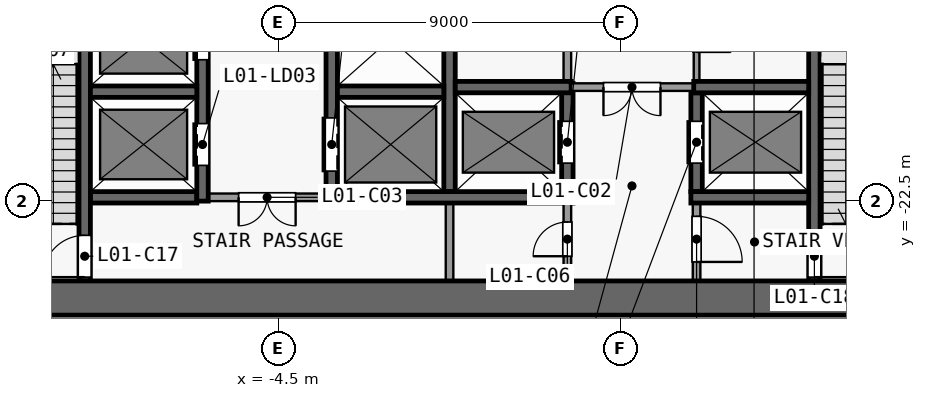
"""IFC4 building model, lengths in metres.
Left out: names, types, materials, properties, quantities, classifications, styles, units other than length and angle.
Written with IfcOpenShell. Run it as: python <this file> out.ifc"""

import sys

from ifc_helpers import new_model, si_unit, direction, frame, frame_2d, origin, place, context, subcontext, project, spatial, rectangle, extrude, element, fill, save


model = new_model("IFC4")
c1 = context("Model", 3, precision=1e-05, world=origin(), true_north=direction((0.0, 1.0)))
c2 = subcontext(c1, "Body", "Model", "MODEL_VIEW")
j1 = project(units=[si_unit("LENGTHUNIT", "METRE"), si_unit("PLANEANGLEUNIT", "RADIAN")], contexts=[c1])
p1 = place(None, origin())
s1 = spatial("IfcSite", under=j1, at=p1, CompositionType="ELEMENT")
p2 = place(p1, origin())
s2 = spatial("IfcBuilding", under=s1, at=p2, CompositionType="ELEMENT")
p3 = place(p2, frame((0.0, 0.0, 8.0)))
s3 = spatial("IfcBuildingStorey", under=s2, at=p3, CompositionType="ELEMENT", Elevation=8.0)
p4 = place(p3, frame((-13.5, -25.05, 0.0), z_axis=(0.0, 0.0, 1.0), x_axis=(1.0, 0.0, 0.0)))
e1 = element("IfcWall", 1, at=p4, inside=s3, PredefinedType="SHEAR", context=c2, shape_type="SweptSolid", body=[
    extrude(rectangle(XDim=27.0, YDim=0.9, at=frame_2d((13.5, 0.0))), origin(), (0.0, 0.0, 1.0), 5.15),
])
p5 = place(p3, frame((-9.45, -22.4, 0.0), z_axis=(0.0, 0.0, 1.0), x_axis=(1.0, 0.0, 0.0)))
e2 = element("IfcWall", 2, at=p5, inside=s3, PredefinedType="SHEAR", context=c2, shape_type="SweptSolid", body=[
    extrude(rectangle(XDim=2.8, YDim=0.3, at=frame_2d((1.4, 0.0))), origin(), (0.0, 0.0, 1.0), 5.15),
])
p6 = place(p3, frame((-3.25, -22.4, 0.0), z_axis=(0.0, 0.0, 1.0), x_axis=(-1.0, 0.0, 0.0)))
e3 = element("IfcWall", 3, at=p6, inside=s3, PredefinedType="PARTITIONING", context=c2, shape_type="SweptSolid", body=[
    extrude(rectangle(XDim=3.1, YDim=0.2, at=frame_2d((1.55, 0.0))), origin(), (0.0, 0.0, 1.0), 5.15),
])
p7 = place(p6, frame((0.8, 0.0, 0.0)))
e4 = element("IfcOpeningElement", 4, at=p7, cuts=e3, PredefinedType="OPENING", context=c2, shape_type="SweptSolid", body=[
    extrude(rectangle(XDim=1.5, YDim=2.1, at=frame_2d((0.75, 1.05))), frame((0.0, 0.11, 0.0), z_axis=(0.0, -1.0, 0.0), x_axis=(1.0, 0.0, 0.0)), (0.0, 0.0, 1.0), 0.22),
])
p8 = place(p3, frame((-2.95, -22.4, 0.0), z_axis=(0.0, 0.0, 1.0), x_axis=(1.0, 0.0, 0.0)))
e5 = element("IfcWall", 5, at=p8, inside=s3, PredefinedType="SHEAR", context=c2, shape_type="SweptSolid", body=[
    extrude(rectangle(XDim=6.2, YDim=0.3, at=frame_2d((3.1, 0.0))), origin(), (0.0, 0.0, 1.0), 5.15),
])
p9 = place(p3, frame((6.35, -22.4, 0.0), z_axis=(0.0, 0.0, 1.0), x_axis=(1.0, 0.0, 0.0)))
e6 = element("IfcWall", 6, at=p9, inside=s3, PredefinedType="SHEAR", context=c2, shape_type="SweptSolid", body=[
    extrude(rectangle(XDim=3.1, YDim=0.3, at=frame_2d((1.55, 0.0))), origin(), (0.0, 0.0, 1.0), 5.15),
])
for number, where, z_axis, x_axis in (
    (7, (-9.45, -19.62, 0.0), (0.0, 0.0, 1.0), (1.0, 0.0, 0.0)),
    (8, (-2.95, -19.62, 0.0), (0.0, 0.0, 1.0), (1.0, 0.0, 0.0)),
):
    element("IfcWall", number, at=place(p3, frame(where, z_axis=z_axis, x_axis=x_axis)), inside=s3, PredefinedType="SHEAR", context=c2, shape_type="SweptSolid", body=[
        extrude(rectangle(XDim=2.8, YDim=0.3, at=frame_2d((1.4, 0.0))), origin(), (0.0, 0.0, 1.0), 5.15),
    ])
p10 = place(p3, frame((0.15, -19.5, 0.0), z_axis=(0.0, 0.0, 1.0), x_axis=(1.0, 0.0, 0.0)))
e9 = element("IfcWall", 9, at=p10, inside=s3, PredefinedType="SHEAR", context=c2, shape_type="SweptSolid", body=[
    extrude(rectangle(XDim=3.05, YDim=0.3, at=frame_2d((1.525, 0.0))), origin(), (0.0, 0.0, 1.0), 5.15),
])
p11 = place(p3, frame((6.575, -19.5, 0.0), z_axis=(0.0, 0.0, 1.0), x_axis=(-1.0, 0.0, 0.0)))
e10 = element("IfcWall", 10, at=p11, inside=s3, PredefinedType="PARTITIONING", context=c2, shape_type="SweptSolid", body=[
    extrude(rectangle(XDim=3.375, YDim=0.2, at=frame_2d((1.688, 0.0))), origin(), (0.0, 0.0, 1.0), 5.15),
])
p12 = place(p11, frame((1.025, 0.0, 0.0)))
e11 = element("IfcOpeningElement", 11, at=p12, cuts=e10, PredefinedType="OPENING", context=c2, shape_type="SweptSolid", body=[
    extrude(rectangle(XDim=1.5, YDim=2.1, at=frame_2d((0.75, 1.05))), frame((0.0, 0.11, 0.0), z_axis=(0.0, -1.0, 0.0), x_axis=(1.0, 0.0, 0.0)), (0.0, 0.0, 1.0), 0.22),
])
p13 = place(p3, frame((6.425, -19.5, 0.0), z_axis=(0.0, 0.0, 1.0), x_axis=(1.0, 0.0, 0.0)))
e12 = element("IfcWall", 12, at=p13, inside=s3, PredefinedType="SHEAR", context=c2, shape_type="SweptSolid", body=[
    extrude(rectangle(XDim=3.025, YDim=0.3, at=frame_2d((1.512, 0.0))), origin(), (0.0, 0.0, 1.0), 5.15),
])
p14 = place(p3, frame((-9.6, -24.6, 0.0), z_axis=(0.0, 0.0, 1.0), x_axis=(0.0, 1.0, 0.0)))
e13 = element("IfcWall", 13, at=p14, inside=s3, PredefinedType="SHEAR", context=c2, shape_type="SweptSolid", body=[
    extrude(rectangle(XDim=7.7, YDim=0.3, at=frame_2d((3.85, 0.0))), origin(), (0.0, 0.0, 1.0), 5.15),
])
p15 = place(p14, frame((0.1, 0.0, 0.0)))
e14 = element("IfcOpeningElement", 14, at=p15, cuts=e13, PredefinedType="OPENING", context=c2, shape_type="SweptSolid", body=[
    extrude(rectangle(XDim=1.1, YDim=2.1, at=frame_2d((0.55, 1.05))), frame((0.0, 0.16, 0.0), z_axis=(0.0, -1.0, 0.0), x_axis=(1.0, 0.0, 0.0)), (0.0, 0.0, 1.0), 0.32),
])
p16 = place(p3, frame((-6.5, -22.5, 0.0), z_axis=(0.0, 0.0, 1.0), x_axis=(0.0, 1.0, 0.0)))
e15 = element("IfcWall", 15, at=p16, inside=s3, PredefinedType="SHEAR", context=c2, shape_type="SweptSolid", body=[
    extrude(rectangle(XDim=14.0, YDim=0.3, at=frame_2d((7.0, 0.0))), origin(), (0.0, 0.0, 1.0), 5.15),
])
p17 = place(p16, frame((0.94, 0.0, 0.0)))
e16 = element("IfcOpeningElement", 16, at=p17, cuts=e15, PredefinedType="OPENING", context=c2, shape_type="SweptSolid", body=[
    extrude(rectangle(XDim=1.1, YDim=2.1, at=frame_2d((0.55, 1.05))), frame((0.0, 0.16, 0.0), z_axis=(0.0, -1.0, 0.0), x_axis=(1.0, 0.0, 0.0)), (0.0, 0.0, 1.0), 0.32),
])
p18 = place(p16, frame((3.72, 0.0, 0.0)))
e17 = element("IfcOpeningElement", 17, at=p18, cuts=e15, PredefinedType="OPENING", context=c2, shape_type="SweptSolid", body=[
    extrude(rectangle(XDim=1.1, YDim=2.1, at=frame_2d((0.55, 1.05))), frame((0.0, 0.16, 0.0), z_axis=(0.0, -1.0, 0.0), x_axis=(1.0, 0.0, 0.0)), (0.0, 0.0, 1.0), 0.32),
])
p19 = place(p16, frame((6.5, 0.0, 0.0)))
e18 = element("IfcOpeningElement", 18, at=p19, cuts=e15, PredefinedType="OPENING", context=c2, shape_type="SweptSolid", body=[
    extrude(rectangle(XDim=1.1, YDim=2.1, at=frame_2d((0.55, 1.05))), frame((0.0, 0.16, 0.0), z_axis=(0.0, -1.0, 0.0), x_axis=(1.0, 0.0, 0.0)), (0.0, 0.0, 1.0), 0.32),
])
p20 = place(p16, frame((9.28, 0.0, 0.0)))
e19 = element("IfcOpeningElement", 19, at=p20, cuts=e15, PredefinedType="OPENING", context=c2, shape_type="SweptSolid", body=[
    extrude(rectangle(XDim=1.1, YDim=2.1, at=frame_2d((0.55, 1.05))), frame((0.0, 0.16, 0.0), z_axis=(0.0, -1.0, 0.0), x_axis=(1.0, 0.0, 0.0)), (0.0, 0.0, 1.0), 0.32),
])
p21 = place(p16, frame((12.06, 0.0, 0.0)))
e20 = element("IfcOpeningElement", 20, at=p21, cuts=e15, PredefinedType="OPENING", context=c2, shape_type="SweptSolid", body=[
    extrude(rectangle(XDim=1.1, YDim=2.1, at=frame_2d((0.55, 1.05))), frame((0.0, 0.16, 0.0), z_axis=(0.0, -1.0, 0.0), x_axis=(1.0, 0.0, 0.0)), (0.0, 0.0, 1.0), 0.32),
])
p22 = place(p3, frame((-3.1, -22.55, 0.0), z_axis=(0.0, 0.0, 1.0), x_axis=(0.0, 1.0, 0.0)))
e21 = element("IfcWall", 21, at=p22, inside=s3, PredefinedType="SHEAR", context=c2, shape_type="SweptSolid", body=[
    extrude(rectangle(XDim=14.05, YDim=0.3, at=frame_2d((7.025, 0.0))), origin(), (0.0, 0.0, 1.0), 5.15),
])
p23 = place(p22, frame((12.11, 0.0, 0.0)))
e22 = element("IfcOpeningElement", 22, at=p23, cuts=e21, PredefinedType="OPENING", context=c2, shape_type="SweptSolid", body=[
    extrude(rectangle(XDim=1.1, YDim=2.1, at=frame_2d((0.55, 1.05))), frame((0.0, 0.16, 0.0), z_axis=(0.0, -1.0, 0.0), x_axis=(1.0, 0.0, 0.0)), (0.0, 0.0, 1.0), 0.32),
])
p24 = place(p22, frame((0.84, 0.0, 0.0)))
e23 = element("IfcOpeningElement", 23, at=p24, cuts=e21, PredefinedType="OPENING", context=c2, shape_type="SweptSolid", body=[
    extrude(rectangle(XDim=1.4, YDim=2.1, at=frame_2d((0.7, 1.05))), frame((0.0, 0.16, 0.0), z_axis=(0.0, -1.0, 0.0), x_axis=(1.0, 0.0, 0.0)), (0.0, 0.0, 1.0), 0.32),
])
p25 = place(p3, frame((0.0, -24.6, 0.0), z_axis=(0.0, 0.0, 1.0), x_axis=(0.0, 1.0, 0.0)))
e24 = element("IfcWall", 24, at=p25, inside=s3, PredefinedType="PARTITIONING", context=c2, shape_type="SweptSolid", body=[
    extrude(rectangle(XDim=2.05, YDim=0.2, at=frame_2d((1.025, 0.0))), origin(), (0.0, 0.0, 1.0), 5.15),
])
p26 = place(p3, frame((0.0, -22.25, 0.0), z_axis=(0.0, 0.0, 1.0), x_axis=(0.0, 1.0, 0.0)))
e25 = element("IfcWall", 25, at=p26, inside=s3, PredefinedType="SHEAR", context=c2, shape_type="SweptSolid", body=[
    extrude(rectangle(XDim=13.75, YDim=0.3, at=frame_2d((6.875, 0.0))), origin(), (0.0, 0.0, 1.0), 5.15),
])
p27 = place(p3, frame((3.1, -24.6, 0.0), z_axis=(0.0, 0.0, 1.0), x_axis=(0.0, 1.0, 0.0)))
e26 = element("IfcWall", 26, at=p27, inside=s3, PredefinedType="PARTITIONING", context=c2, shape_type="SweptSolid", body=[
    extrude(rectangle(XDim=2.05, YDim=0.2, at=frame_2d((1.025, 0.0))), origin(), (0.0, 0.0, 1.0), 5.15),
])
p28 = place(p27, frame((0.65, 0.0, 0.0)))
e27 = element("IfcOpeningElement", 27, at=p28, cuts=e26, PredefinedType="OPENING", context=c2, shape_type="SweptSolid", body=[
    extrude(rectangle(XDim=0.9, YDim=2.1, at=frame_2d((0.45, 1.05))), frame((0.0, 0.11, 0.0), z_axis=(0.0, -1.0, 0.0), x_axis=(1.0, 0.0, 0.0)), (0.0, 0.0, 1.0), 0.22),
])
p29 = place(p3, frame((3.1, -22.25, 0.0), z_axis=(0.0, 0.0, 1.0), x_axis=(0.0, 1.0, 0.0)))
e28 = element("IfcWall", 28, at=p29, inside=s3, PredefinedType="SHEAR", context=c2, shape_type="SweptSolid", body=[
    extrude(rectangle(XDim=2.85, YDim=0.3, at=frame_2d((1.425, 0.0))), origin(), (0.0, 0.0, 1.0), 5.15),
])
p30 = place(p29, frame((0.75, 0.0, 0.0)))
e29 = element("IfcOpeningElement", 29, at=p30, cuts=e28, PredefinedType="OPENING", context=c2, shape_type="SweptSolid", body=[
    extrude(rectangle(XDim=1.1, YDim=2.1, at=frame_2d((0.55, 1.05))), frame((0.0, 0.16, 0.0), z_axis=(0.0, -1.0, 0.0), x_axis=(1.0, 0.0, 0.0)), (0.0, 0.0, 1.0), 0.32),
])
p31 = place(p3, frame((3.1, -19.6, 0.0), z_axis=(0.0, 0.0, 1.0), x_axis=(0.0, 1.0, 0.0)))
e30 = element("IfcWall", 30, at=p31, inside=s3, PredefinedType="PARTITIONING", context=c2, shape_type="SweptSolid", body=[
    extrude(rectangle(XDim=8.45, YDim=0.2, at=frame_2d((4.225, 0.0))), origin(), (0.0, 0.0, 1.0), 5.15),
])
p32 = place(p31, frame((3.625, 0.0, 0.0)))
e31 = element("IfcOpeningElement", 31, at=p32, cuts=e30, PredefinedType="OPENING", context=c2, shape_type="SweptSolid", body=[
    extrude(rectangle(XDim=1.2, YDim=2.1, at=frame_2d((0.6, 1.05))), frame((0.0, 0.11, 0.0), z_axis=(0.0, -1.0, 0.0), x_axis=(1.0, 0.0, 0.0)), (0.0, 0.0, 1.0), 0.22),
])
p33 = place(p3, frame((6.5, -22.55, 0.0), z_axis=(0.0, 0.0, 1.0), x_axis=(0.0, -1.0, 0.0)))
e32 = element("IfcWall", 32, at=p33, inside=s3, PredefinedType="PARTITIONING", context=c2, shape_type="SweptSolid", body=[
    extrude(rectangle(XDim=2.05, YDim=0.2, at=frame_2d((1.025, 0.0))), origin(), (0.0, 0.0, 1.0), 5.15),
])
p34 = place(p33, frame((0.35, 0.0, 0.0)))
e33 = element("IfcOpeningElement", 33, at=p34, cuts=e32, PredefinedType="OPENING", context=c2, shape_type="SweptSolid", body=[
    extrude(rectangle(XDim=1.2, YDim=2.1, at=frame_2d((0.6, 1.05))), frame((0.0, 0.11, 0.0), z_axis=(0.0, -1.0, 0.0), x_axis=(1.0, 0.0, 0.0)), (0.0, 0.0, 1.0), 0.22),
])
p35 = place(p3, frame((6.5, -22.25, 0.0), z_axis=(0.0, 0.0, 1.0), x_axis=(0.0, 1.0, 0.0)))
e34 = element("IfcWall", 34, at=p35, inside=s3, PredefinedType="SHEAR", context=c2, shape_type="SweptSolid", body=[
    extrude(rectangle(XDim=2.6, YDim=0.3, at=frame_2d((1.3, 0.0))), origin(), (0.0, 0.0, 1.0), 5.15),
])
p36 = place(p35, frame((0.75, 0.0, 0.0)))
e35 = element("IfcOpeningElement", 35, at=p36, cuts=e34, PredefinedType="OPENING", context=c2, shape_type="SweptSolid", body=[
    extrude(rectangle(XDim=1.1, YDim=2.1, at=frame_2d((0.55, 1.05))), frame((0.0, 0.16, 0.0), z_axis=(0.0, -1.0, 0.0), x_axis=(1.0, 0.0, 0.0)), (0.0, 0.0, 1.0), 0.32),
])
p37 = place(p3, frame((6.5, -8.5, 0.0), z_axis=(0.0, 0.0, 1.0), x_axis=(0.0, -1.0, 0.0)))
e36 = element("IfcWall", 36, at=p37, inside=s3, PredefinedType="PARTITIONING", context=c2, shape_type="SweptSolid", body=[
    extrude(rectangle(XDim=10.85, YDim=0.15, at=frame_2d((5.425, 0.0))), origin(), (0.0, 0.0, 1.0), 5.15),
])
p38 = place(p37, frame((9.175, 0.0, 0.0)))
e37 = element("IfcOpeningElement", 37, at=p38, cuts=e36, PredefinedType="OPENING", context=c2, shape_type="SweptSolid", body=[
    extrude(rectangle(XDim=0.9, YDim=2.1, at=frame_2d((0.45, 1.05))), frame((0.0, 0.085, 0.0), z_axis=(0.0, -1.0, 0.0), x_axis=(1.0, 0.0, 0.0)), (0.0, 0.0, 1.0), 0.17),
])
p39 = place(p37, frame((3.525, 0.0, 0.0)))
e38 = element("IfcOpeningElement", 38, at=p39, cuts=e36, PredefinedType="OPENING", context=c2, shape_type="SweptSolid", body=[
    extrude(rectangle(XDim=1.2, YDim=2.1, at=frame_2d((0.6, 1.05))), frame((0.0, 0.085, 0.0), z_axis=(0.0, -1.0, 0.0), x_axis=(1.0, 0.0, 0.0)), (0.0, 0.0, 1.0), 0.17),
])
p40 = place(p3, frame((9.6, -16.9, 0.0), z_axis=(0.0, 0.0, 1.0), x_axis=(0.0, -1.0, 0.0)))
e39 = element("IfcWall", 39, at=p40, inside=s3, PredefinedType="SHEAR", context=c2, shape_type="SweptSolid", body=[
    extrude(rectangle(XDim=7.7, YDim=0.3, at=frame_2d((3.85, 0.0))), origin(), (0.0, 0.0, 1.0), 5.15),
])
p41 = place(p40, frame((6.5, 0.0, 0.0)))
e40 = element("IfcOpeningElement", 40, at=p41, cuts=e39, PredefinedType="OPENING", context=c2, shape_type="SweptSolid", body=[
    extrude(rectangle(XDim=1.1, YDim=2.1, at=frame_2d((0.55, 1.05))), frame((0.0, 0.16, 0.0), z_axis=(0.0, -1.0, 0.0), x_axis=(1.0, 0.0, 0.0)), (0.0, 0.0, 1.0), 0.32),
])
p42 = place(p30, origin())
e41 = element("IfcDoor", 41, at=p42, inside=s3, OperationType="DOUBLE_DOOR_SLIDING", PredefinedType="DOOR", context=c2, shape_type="SweptSolid", body=[
    extrude(rectangle(XDim=1.1, YDim=2.1, at=frame_2d((0.55, 1.05))), frame((0.0, 0.025, 0.0), z_axis=(0.0, -1.0, 0.0), x_axis=(1.0, 0.0, 0.0)), (0.0, 0.0, 1.0), 0.05),
])
fill(e29, e41)
p43 = place(p36, origin())
e42 = element("IfcDoor", 42, at=p43, inside=s3, OperationType="DOUBLE_DOOR_SLIDING", PredefinedType="DOOR", context=c2, shape_type="SweptSolid", body=[
    extrude(rectangle(XDim=1.1, YDim=2.1, at=frame_2d((0.55, 1.05))), frame((0.0, 0.025, 0.0), z_axis=(0.0, -1.0, 0.0), x_axis=(1.0, 0.0, 0.0)), (0.0, 0.0, 1.0), 0.05),
])
fill(e35, e42)
p44 = place(p17, origin())
e43 = element("IfcDoor", 43, at=p44, inside=s3, OperationType="DOUBLE_DOOR_SLIDING", PredefinedType="DOOR", context=c2, shape_type="SweptSolid", body=[
    extrude(rectangle(XDim=1.1, YDim=2.1, at=frame_2d((0.55, 1.05))), frame((0.0, 0.025, 0.0), z_axis=(0.0, -1.0, 0.0), x_axis=(1.0, 0.0, 0.0)), (0.0, 0.0, 1.0), 0.05),
])
fill(e16, e43)
p45 = place(p18, origin())
e44 = element("IfcDoor", 44, at=p45, inside=s3, OperationType="DOUBLE_DOOR_SLIDING", PredefinedType="DOOR", context=c2, shape_type="SweptSolid", body=[
    extrude(rectangle(XDim=1.1, YDim=2.1, at=frame_2d((0.55, 1.05))), frame((0.0, 0.025, 0.0), z_axis=(0.0, -1.0, 0.0), x_axis=(1.0, 0.0, 0.0)), (0.0, 0.0, 1.0), 0.05),
])
fill(e17, e44)
p46 = place(p24, origin())
e45 = element("IfcDoor", 45, at=p46, inside=s3, OperationType="DOUBLE_DOOR_SLIDING", PredefinedType="DOOR", context=c2, shape_type="SweptSolid", body=[
    extrude(rectangle(XDim=1.4, YDim=2.1, at=frame_2d((0.7, 1.05))), frame((0.0, 0.025, 0.0), z_axis=(0.0, -1.0, 0.0), x_axis=(1.0, 0.0, 0.0)), (0.0, 0.0, 1.0), 0.05),
])
fill(e23, e45)
p47 = place(p34, origin())
e46 = element("IfcDoor", 46, at=p47, inside=s3, OperationType="SINGLE_SWING_RIGHT", PredefinedType="DOOR", context=c2, shape_type="SweptSolid", body=[
    extrude(rectangle(XDim=1.2, YDim=2.1, at=frame_2d((0.6, 1.05))), frame((0.0, 0.025, 0.0), z_axis=(0.0, -1.0, 0.0), x_axis=(1.0, 0.0, 0.0)), (0.0, 0.0, 1.0), 0.05),
])
fill(e33, e46)
p48 = place(p12, origin())
e47 = element("IfcDoor", 47, at=p48, inside=s3, OperationType="DOUBLE_DOOR_SINGLE_SWING", PredefinedType="DOOR", context=c2, shape_type="SweptSolid", body=[
    extrude(rectangle(XDim=1.5, YDim=2.1, at=frame_2d((0.75, 1.05))), frame((0.0, 0.025, 0.0), z_axis=(0.0, -1.0, 0.0), x_axis=(1.0, 0.0, 0.0)), (0.0, 0.0, 1.0), 0.05),
])
fill(e11, e47)
p49 = place(p7, origin())
e48 = element("IfcDoor", 48, at=p49, inside=s3, OperationType="DOUBLE_DOOR_SINGLE_SWING", PredefinedType="DOOR", context=c2, shape_type="SweptSolid", body=[
    extrude(rectangle(XDim=1.5, YDim=2.1, at=frame_2d((0.75, 1.05))), frame((0.0, 0.025, 0.0), z_axis=(0.0, -1.0, 0.0), x_axis=(1.0, 0.0, 0.0)), (0.0, 0.0, 1.0), 0.05),
])
fill(e4, e48)
p50 = place(p28, origin())
e49 = element("IfcDoor", 49, at=p50, inside=s3, OperationType="SINGLE_SWING_LEFT", PredefinedType="DOOR", context=c2, shape_type="SweptSolid", body=[
    extrude(rectangle(XDim=0.9, YDim=2.1, at=frame_2d((0.45, 1.05))), frame((0.0, 0.025, 0.0), z_axis=(0.0, -1.0, 0.0), x_axis=(1.0, 0.0, 0.0)), (0.0, 0.0, 1.0), 0.05),
])
fill(e27, e49)
p51 = place(p15, origin())
e50 = element("IfcDoor", 50, at=p51, inside=s3, OperationType="SINGLE_SWING_LEFT", PredefinedType="DOOR", context=c2, shape_type="SweptSolid", body=[
    extrude(rectangle(XDim=1.1, YDim=2.1, at=frame_2d((0.55, 1.05))), frame((0.0, 0.025, 0.0), z_axis=(0.0, -1.0, 0.0), x_axis=(1.0, 0.0, 0.0)), (0.0, 0.0, 1.0), 0.05),
])
fill(e14, e50)
p52 = place(p41, origin())
e51 = element("IfcDoor", 51, at=p52, inside=s3, OperationType="SINGLE_SWING_RIGHT", PredefinedType="DOOR", context=c2, shape_type="SweptSolid", body=[
    extrude(rectangle(XDim=1.1, YDim=2.1, at=frame_2d((0.55, 1.05))), frame((0.0, 0.025, 0.0), z_axis=(0.0, -1.0, 0.0), x_axis=(1.0, 0.0, 0.0)), (0.0, 0.0, 1.0), 0.05),
])
fill(e40, e51)
save(model, sys.argv[1])
